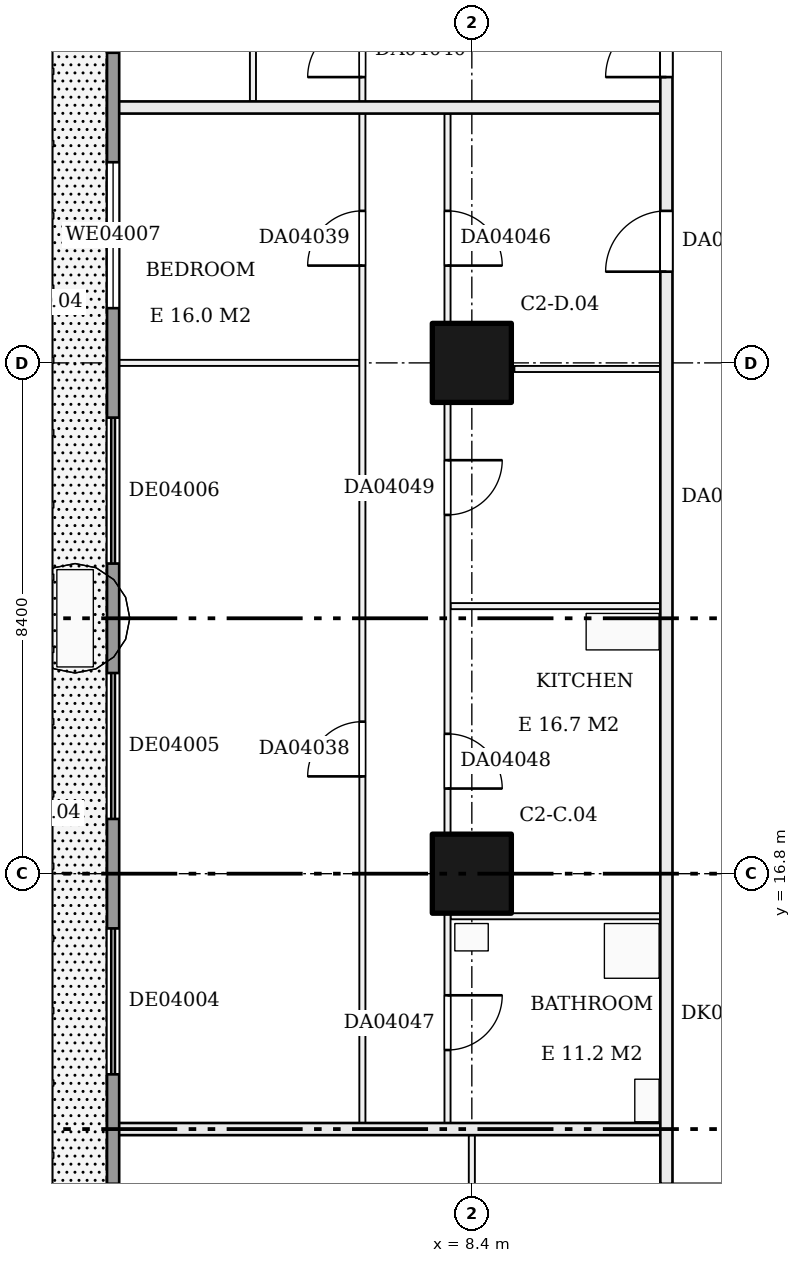
"""IFC4 building model, lengths in metres.
Left out: names, types, materials, properties, quantities, classifications, styles, units other than length and angle.
Written with IfcOpenShell. Run it as: python <this file> out.ifc"""

import sys

from ifc_helpers import new_model, si_unit, direction, frame, frame_2d, origin, origin_2d, place, context, subcontext, project, spatial, rectangle, extrude, element, fill, save


model = new_model("IFC4")
c1 = context("Model", 3, precision=1e-05, world=origin(), true_north=direction((0.0, 1.0)))
c2 = subcontext(c1, "Body", "Model", "MODEL_VIEW")
j1 = project(units=[si_unit("LENGTHUNIT", "METRE"), si_unit("PLANEANGLEUNIT", "RADIAN")], contexts=[c1])
p1 = place(None, origin())
s1 = spatial("IfcSite", under=j1, at=p1, CompositionType="ELEMENT")
p2 = place(p1, origin())
s2 = spatial("IfcBuilding", under=s1, at=p2, CompositionType="ELEMENT")
p3 = place(p2, frame((0.0, 0.0, 25.2)))
s3 = spatial("IfcBuildingStorey", under=s2, at=p3, CompositionType="ELEMENT", Elevation=25.2)
for number, where, z_axis, x_axis in (
    (1, (8.4, 16.8, 0.0), (0.0, 0.0, 1.0), (1.0, 0.0, 0.0)),
    (2, (8.4, 25.2, 0.0), (0.0, 0.0, 1.0), (1.0, 0.0, 0.0)),
):
    element("IfcColumn", number, at=place(p3, frame(where, z_axis=z_axis, x_axis=x_axis)), inside=s3, PredefinedType="COLUMN", context=c2, shape_type="SweptSolid", body=[
        extrude(rectangle(XDim=1.3, YDim=1.3, at=origin_2d()), origin(), (0.0, 0.0, 1.0), 3.22),
    ])
p4 = place(p3, frame((11.5, 11.6, 0.0), z_axis=(0.0, 0.0, 1.0), x_axis=(1.0, 0.0, 0.0)))
e3 = element("IfcWall", 3, at=p4, inside=s3, PredefinedType="PARTITIONING", context=c2, shape_type="SweptSolid", body=[
    extrude(rectangle(XDim=30.5, YDim=0.2, at=frame_2d((15.25, 0.0))), origin(), (0.0, 0.0, 1.0), 3.22),
])
p5 = place(p4, frame((8.04, 0.0, 0.0)))
e4 = element("IfcOpeningElement", 4, at=p5, cuts=e3, PredefinedType="OPENING", context=c2, shape_type="SweptSolid", body=[
    extrude(rectangle(XDim=1.0, YDim=2.1, at=frame_2d((0.5, 1.05))), frame((0.0, 0.11, 0.0), z_axis=(0.0, -1.0, 0.0), x_axis=(1.0, 0.0, 0.0)), (0.0, 0.0, 1.0), 0.22),
])
p6 = place(p4, frame((23.75, 0.0, 0.0)))
e5 = element("IfcOpeningElement", 5, at=p6, cuts=e3, PredefinedType="OPENING", context=c2, shape_type="SweptSolid", body=[
    extrude(rectangle(XDim=1.0, YDim=2.1, at=frame_2d((0.5, 1.05))), frame((0.0, 0.11, 0.0), z_axis=(0.0, -1.0, 0.0), x_axis=(1.0, 0.0, 0.0)), (0.0, 0.0, 1.0), 0.22),
])
p7 = place(p4, frame((26.8, 0.0, 0.0)))
e6 = element("IfcOpeningElement", 6, at=p7, cuts=e3, PredefinedType="OPENING", context=c2, shape_type="SweptSolid", body=[
    extrude(rectangle(XDim=1.0, YDim=2.1, at=frame_2d((0.5, 1.05))), frame((0.0, 0.11, 0.0), z_axis=(0.0, -1.0, 0.0), x_axis=(1.0, 0.0, 0.0)), (0.0, 0.0, 1.0), 0.22),
])
p8 = place(p3, frame((2.5, 12.6, 0.0), z_axis=(0.0, 0.0, 1.0), x_axis=(1.0, 0.0, 0.0)))
e7 = element("IfcWall", 7, at=p8, inside=s3, PredefinedType="PARTITIONING", context=c2, shape_type="SweptSolid", body=[
    extrude(rectangle(XDim=9.0, YDim=0.2, at=frame_2d((4.5, 0.0))), origin(), (0.0, 0.0, 1.0), 3.22),
])
for number, where, z_axis, x_axis in (
    (8, (8.05, 16.1, 0.0), (0.0, 0.0, 1.0), (1.0, 0.0, 0.0)),
    (9, (8.05, 21.2, 0.0), (0.0, 0.0, 1.0), (1.0, 0.0, 0.0)),
):
    element("IfcWall", number, at=place(p3, frame(where, z_axis=z_axis, x_axis=x_axis)), inside=s3, PredefinedType="PARTITIONING", context=c2, shape_type="SweptSolid", body=[
        extrude(rectangle(XDim=3.45, YDim=0.1, at=frame_2d((1.725, 0.0))), origin(), (0.0, 0.0, 1.0), 3.22),
    ])
p9 = place(p3, frame((9.1, 25.1, 0.0), z_axis=(0.0, 0.0, 1.0), x_axis=(1.0, 0.0, 0.0)))
e10 = element("IfcWall", 10, at=p9, inside=s3, PredefinedType="PARTITIONING", context=c2, shape_type="SweptSolid", body=[
    extrude(rectangle(XDim=2.4, YDim=0.1, at=frame_2d((1.2, 0.0))), origin(), (0.0, 0.0, 1.0), 3.22),
])
p10 = place(p3, frame((2.5, 25.2, 0.0), z_axis=(0.0, 0.0, 1.0), x_axis=(1.0, 0.0, 0.0)))
e11 = element("IfcWall", 11, at=p10, inside=s3, PredefinedType="PARTITIONING", context=c2, shape_type="SweptSolid", body=[
    extrude(rectangle(XDim=4.05, YDim=0.1, at=frame_2d((2.025, 0.0))), origin(), (0.0, 0.0, 1.0), 3.22),
])
p11 = place(p3, frame((2.5, 29.4, 0.0), z_axis=(0.0, 0.0, 1.0), x_axis=(1.0, 0.0, 0.0)))
e12 = element("IfcWall", 12, at=p11, inside=s3, PredefinedType="PARTITIONING", context=c2, shape_type="SweptSolid", body=[
    extrude(rectangle(XDim=9.0, YDim=0.2, at=frame_2d((4.5, 0.0))), origin(), (0.0, 0.0, 1.0), 3.22),
])
p12 = place(p3, frame((4.8, 29.5, 0.0), z_axis=(0.0, 0.0, 1.0), x_axis=(0.0, 1.0, 0.0)))
e13 = element("IfcWall", 13, at=p12, inside=s3, PredefinedType="PARTITIONING", context=c2, shape_type="SweptSolid", body=[
    extrude(rectangle(XDim=4.0, YDim=0.1, at=frame_2d((2.0, 0.0))), origin(), (0.0, 0.0, 1.0), 3.22),
])
p13 = place(p12, frame((1.5, 0.0, 0.0)))
e14 = element("IfcOpeningElement", 14, at=p13, cuts=e13, PredefinedType="OPENING", context=c2, shape_type="SweptSolid", body=[
    extrude(rectangle(XDim=0.9, YDim=2.1, at=frame_2d((0.45, 1.05))), frame((0.0, 0.06, 0.0), z_axis=(0.0, -1.0, 0.0), x_axis=(1.0, 0.0, 0.0)), (0.0, 0.0, 1.0), 0.12),
])
p14 = place(p3, frame((6.6, 12.7, 0.0), z_axis=(0.0, 0.0, 1.0), x_axis=(0.0, 1.0, 0.0)))
e15 = element("IfcWall", 15, at=p14, inside=s3, PredefinedType="PARTITIONING", context=c2, shape_type="SweptSolid", body=[
    extrude(rectangle(XDim=20.8, YDim=0.1, at=frame_2d((10.4, 0.0))), origin(), (0.0, 0.0, 1.0), 3.22),
])
p15 = place(p14, frame((5.7, 0.0, 0.0)))
e16 = element("IfcOpeningElement", 16, at=p15, cuts=e15, PredefinedType="OPENING", context=c2, shape_type="SweptSolid", body=[
    extrude(rectangle(XDim=0.9, YDim=2.1, at=frame_2d((0.45, 1.05))), frame((0.0, 0.06, 0.0), z_axis=(0.0, -1.0, 0.0), x_axis=(1.0, 0.0, 0.0)), (0.0, 0.0, 1.0), 0.12),
])
p16 = place(p14, frame((14.1, 0.0, 0.0)))
e17 = element("IfcOpeningElement", 17, at=p16, cuts=e15, PredefinedType="OPENING", context=c2, shape_type="SweptSolid", body=[
    extrude(rectangle(XDim=0.9, YDim=2.1, at=frame_2d((0.45, 1.05))), frame((0.0, 0.06, 0.0), z_axis=(0.0, -1.0, 0.0), x_axis=(1.0, 0.0, 0.0)), (0.0, 0.0, 1.0), 0.12),
])
p17 = place(p14, frame((17.2, 0.0, 0.0)))
e18 = element("IfcOpeningElement", 18, at=p17, cuts=e15, PredefinedType="OPENING", context=c2, shape_type="SweptSolid", body=[
    extrude(rectangle(XDim=0.9, YDim=2.1, at=frame_2d((0.45, 1.05))), frame((0.0, 0.06, 0.0), z_axis=(0.0, -1.0, 0.0), x_axis=(1.0, 0.0, 0.0)), (0.0, 0.0, 1.0), 0.12),
])
p18 = place(p14, frame((19.36, 0.0, 0.0)))
e19 = element("IfcOpeningElement", 19, at=p18, cuts=e15, PredefinedType="OPENING", context=c2, shape_type="SweptSolid", body=[
    extrude(rectangle(XDim=0.9, YDim=2.1, at=frame_2d((0.45, 1.05))), frame((0.0, 0.06, 0.0), z_axis=(0.0, -1.0, 0.0), x_axis=(1.0, 0.0, 0.0)), (0.0, 0.0, 1.0), 0.12),
])
p19 = place(p3, frame((8.0, 12.7, 0.0), z_axis=(0.0, 0.0, 1.0), x_axis=(0.0, 1.0, 0.0)))
e20 = element("IfcWall", 20, at=p19, inside=s3, PredefinedType="PARTITIONING", context=c2, shape_type="SweptSolid", body=[
    extrude(rectangle(XDim=16.6, YDim=0.1, at=frame_2d((8.3, 0.0))), origin(), (0.0, 0.0, 1.0), 3.22),
])
p20 = place(p19, frame((14.1, 0.0, 0.0)))
e21 = element("IfcOpeningElement", 21, at=p20, cuts=e20, PredefinedType="OPENING", context=c2, shape_type="SweptSolid", body=[
    extrude(rectangle(XDim=0.9, YDim=2.1, at=frame_2d((0.45, 1.05))), frame((0.0, 0.06, 0.0), z_axis=(0.0, -1.0, 0.0), x_axis=(1.0, 0.0, 0.0)), (0.0, 0.0, 1.0), 0.12),
])
p21 = place(p19, frame((1.2, 0.0, 0.0)))
e22 = element("IfcOpeningElement", 22, at=p21, cuts=e20, PredefinedType="OPENING", context=c2, shape_type="SweptSolid", body=[
    extrude(rectangle(XDim=0.9, YDim=2.1, at=frame_2d((0.45, 1.05))), frame((0.0, 0.06, 0.0), z_axis=(0.0, -1.0, 0.0), x_axis=(1.0, 0.0, 0.0)), (0.0, 0.0, 1.0), 0.12),
])
p22 = place(p19, frame((5.5, 0.0, 0.0)))
e23 = element("IfcOpeningElement", 23, at=p22, cuts=e20, PredefinedType="OPENING", context=c2, shape_type="SweptSolid", body=[
    extrude(rectangle(XDim=0.9, YDim=2.1, at=frame_2d((0.45, 1.05))), frame((0.0, 0.06, 0.0), z_axis=(0.0, -1.0, 0.0), x_axis=(1.0, 0.0, 0.0)), (0.0, 0.0, 1.0), 0.12),
])
p23 = place(p19, frame((10.0, 0.0, 0.0)))
e24 = element("IfcOpeningElement", 24, at=p23, cuts=e20, PredefinedType="OPENING", context=c2, shape_type="SweptSolid", body=[
    extrude(rectangle(XDim=0.9, YDim=2.1, at=frame_2d((0.45, 1.05))), frame((0.0, 0.06, 0.0), z_axis=(0.0, -1.0, 0.0), x_axis=(1.0, 0.0, 0.0)), (0.0, 0.0, 1.0), 0.12),
])
p24 = place(p3, frame((8.4, 9.1, 0.0), z_axis=(0.0, 0.0, 1.0), x_axis=(0.0, 1.0, 0.0)))
e25 = element("IfcWall", 25, at=p24, inside=s3, PredefinedType="PARTITIONING", context=c2, shape_type="SweptSolid", body=[
    extrude(rectangle(XDim=3.4, YDim=0.1, at=frame_2d((1.7, 0.0))), origin(), (0.0, 0.0, 1.0), 3.22),
])
p25 = place(p3, frame((11.6, 11.7, 0.0), z_axis=(0.0, 0.0, 1.0), x_axis=(0.0, 1.0, 0.0)))
e26 = element("IfcWall", 26, at=p25, inside=s3, PredefinedType="PARTITIONING", context=c2, shape_type="SweptSolid", body=[
    extrude(rectangle(XDim=30.3, YDim=0.2, at=frame_2d((15.15, 0.0))), origin(), (0.0, 0.0, 1.0), 3.22),
])
p26 = place(p25, frame((15.0, 0.0, 0.0)))
e27 = element("IfcOpeningElement", 27, at=p26, cuts=e26, PredefinedType="OPENING", context=c2, shape_type="SweptSolid", body=[
    extrude(rectangle(XDim=1.0, YDim=2.1, at=frame_2d((0.5, 1.05))), frame((0.0, 0.11, 0.0), z_axis=(0.0, -1.0, 0.0), x_axis=(1.0, 0.0, 0.0)), (0.0, 0.0, 1.0), 0.22),
])
p27 = place(p25, frame((18.2, 0.0, 0.0)))
e28 = element("IfcOpeningElement", 28, at=p27, cuts=e26, PredefinedType="OPENING", context=c2, shape_type="SweptSolid", body=[
    extrude(rectangle(XDim=1.0, YDim=2.1, at=frame_2d((0.5, 1.05))), frame((0.0, 0.11, 0.0), z_axis=(0.0, -1.0, 0.0), x_axis=(1.0, 0.0, 0.0)), (0.0, 0.0, 1.0), 0.22),
])
p28 = place(p25, frame((22.4, 0.0, 0.0)))
e29 = element("IfcOpeningElement", 29, at=p28, cuts=e26, PredefinedType="OPENING", context=c2, shape_type="SweptSolid", body=[
    extrude(rectangle(XDim=1.0, YDim=2.1, at=frame_2d((0.5, 1.05))), frame((0.0, 0.11, 0.0), z_axis=(0.0, -1.0, 0.0), x_axis=(1.0, 0.0, 0.0)), (0.0, 0.0, 1.0), 0.22),
])
p29 = place(p25, frame((28.84, 0.0, 0.0)))
e30 = element("IfcOpeningElement", 30, at=p29, cuts=e26, PredefinedType="OPENING", context=c2, shape_type="SweptSolid", body=[
    extrude(rectangle(XDim=1.0, YDim=2.1, at=frame_2d((0.5, 1.05))), frame((0.0, 0.11, 0.0), z_axis=(0.0, -1.0, 0.0), x_axis=(1.0, 0.0, 0.0)), (0.0, 0.0, 1.0), 0.22),
])
p30 = place(p3, frame((2.5, 53.8, 0.0), z_axis=(0.0, 0.0, 1.0), x_axis=(0.0, -1.0, 0.0)))
e31 = element("IfcWall", 31, at=p30, inside=s3, PredefinedType="SOLIDWALL", context=c2, shape_type="SweptSolid", body=[
    extrude(rectangle(XDim=48.8, YDim=0.2, at=frame_2d((24.4, 0.0))), origin(), (0.0, 0.0, 1.0), 3.22),
])
p31 = place(p30, frame((46.1, 0.0, 0.0)))
e32 = element("IfcOpeningElement", 32, at=p31, cuts=e31, PredefinedType="OPENING", context=c2, shape_type="SweptSolid", body=[
    extrude(rectangle(XDim=2.4, YDim=2.2, at=frame_2d((1.2, 1.1))), frame((0.0, 0.11, 0.0), z_axis=(0.0, -1.0, 0.0), x_axis=(1.0, 0.0, 0.0)), (0.0, 0.0, 1.0), 0.22),
])
p32 = place(p30, frame((42.1, 0.0, 0.0)))
e33 = element("IfcOpeningElement", 33, at=p32, cuts=e31, PredefinedType="OPENING", context=c2, shape_type="SweptSolid", body=[
    extrude(rectangle(XDim=2.4, YDim=2.2, at=frame_2d((1.2, 1.1))), frame((0.0, 0.11, 0.0), z_axis=(0.0, -1.0, 0.0), x_axis=(1.0, 0.0, 0.0)), (0.0, 0.0, 1.0), 0.22),
])
p33 = place(p30, frame((37.9, 0.0, 0.0)))
e34 = element("IfcOpeningElement", 34, at=p33, cuts=e31, PredefinedType="OPENING", context=c2, shape_type="SweptSolid", body=[
    extrude(rectangle(XDim=2.4, YDim=2.2, at=frame_2d((1.2, 1.1))), frame((0.0, 0.11, 0.0), z_axis=(0.0, -1.0, 0.0), x_axis=(1.0, 0.0, 0.0)), (0.0, 0.0, 1.0), 0.22),
])
p34 = place(p30, frame((33.7, 0.0, 0.0)))
e35 = element("IfcOpeningElement", 35, at=p34, cuts=e31, PredefinedType="OPENING", context=c2, shape_type="SweptSolid", body=[
    extrude(rectangle(XDim=2.4, YDim=2.2, at=frame_2d((1.2, 1.1))), frame((0.0, 0.11, 0.0), z_axis=(0.0, -1.0, 0.0), x_axis=(1.0, 0.0, 0.0)), (0.0, 0.0, 1.0), 0.22),
])
p35 = place(p30, frame((29.5, 0.0, 0.0)))
e36 = element("IfcOpeningElement", 36, at=p35, cuts=e31, PredefinedType="OPENING", context=c2, shape_type="SweptSolid", body=[
    extrude(rectangle(XDim=2.4, YDim=2.2, at=frame_2d((1.2, 1.1))), frame((0.0, 0.11, 0.0), z_axis=(0.0, -1.0, 0.0), x_axis=(1.0, 0.0, 0.0)), (0.0, 0.0, 1.0), 0.22),
])
p36 = place(p30, frame((25.3, 0.0, 0.9)))
e37 = element("IfcOpeningElement", 37, at=p36, cuts=e31, PredefinedType="OPENING", context=c2, shape_type="SweptSolid", body=[
    extrude(rectangle(XDim=2.4, YDim=1.5, at=frame_2d((1.2, 0.75))), frame((0.0, 0.11, 0.0), z_axis=(0.0, -1.0, 0.0), x_axis=(1.0, 0.0, 0.0)), (0.0, 0.0, 1.0), 0.22),
])
p37 = place(p30, frame((21.1, 0.0, 0.0)))
e38 = element("IfcOpeningElement", 38, at=p37, cuts=e31, PredefinedType="OPENING", context=c2, shape_type="SweptSolid", body=[
    extrude(rectangle(XDim=2.4, YDim=2.2, at=frame_2d((1.2, 1.1))), frame((0.0, 0.11, 0.0), z_axis=(0.0, -1.0, 0.0), x_axis=(1.0, 0.0, 0.0)), (0.0, 0.0, 1.0), 0.22),
])
p38 = place(p30, frame((16.9, 0.0, 0.0)))
e39 = element("IfcOpeningElement", 39, at=p38, cuts=e31, PredefinedType="OPENING", context=c2, shape_type="SweptSolid", body=[
    extrude(rectangle(XDim=2.4, YDim=2.2, at=frame_2d((1.2, 1.1))), frame((0.0, 0.11, 0.0), z_axis=(0.0, -1.0, 0.0), x_axis=(1.0, 0.0, 0.0)), (0.0, 0.0, 1.0), 0.22),
])
p39 = place(p30, frame((12.7, 0.0, 0.0)))
e40 = element("IfcOpeningElement", 40, at=p39, cuts=e31, PredefinedType="OPENING", context=c2, shape_type="SweptSolid", body=[
    extrude(rectangle(XDim=2.4, YDim=2.2, at=frame_2d((1.2, 1.1))), frame((0.0, 0.11, 0.0), z_axis=(0.0, -1.0, 0.0), x_axis=(1.0, 0.0, 0.0)), (0.0, 0.0, 1.0), 0.22),
])
p40 = place(p30, frame((8.5, 0.0, 0.9)))
e41 = element("IfcOpeningElement", 41, at=p40, cuts=e31, PredefinedType="OPENING", context=c2, shape_type="SweptSolid", body=[
    extrude(rectangle(XDim=2.4, YDim=1.5, at=frame_2d((1.2, 0.75))), frame((0.0, 0.11, 0.0), z_axis=(0.0, -1.0, 0.0), x_axis=(1.0, 0.0, 0.0)), (0.0, 0.0, 1.0), 0.22),
])
p41 = place(p30, frame((4.3, 0.0, 0.9)))
e42 = element("IfcOpeningElement", 42, at=p41, cuts=e31, PredefinedType="OPENING", context=c2, shape_type="SweptSolid", body=[
    extrude(rectangle(XDim=2.4, YDim=1.5, at=frame_2d((1.2, 0.75))), frame((0.0, 0.11, 0.0), z_axis=(0.0, -1.0, 0.0), x_axis=(1.0, 0.0, 0.0)), (0.0, 0.0, 1.0), 0.22),
])
p42 = place(p30, frame((0.3, 0.0, 0.9)))
e43 = element("IfcOpeningElement", 43, at=p42, cuts=e31, PredefinedType="OPENING", context=c2, shape_type="SweptSolid", body=[
    extrude(rectangle(XDim=2.4, YDim=1.5, at=frame_2d((1.2, 0.75))), frame((0.0, 0.11, 0.0), z_axis=(0.0, -1.0, 0.0), x_axis=(1.0, 0.0, 0.0)), (0.0, 0.0, 1.0), 0.22),
])
p43 = place(p15, origin())
e44 = element("IfcDoor", 44, at=p43, inside=s3, OperationType="SINGLE_SWING_LEFT", PredefinedType="DOOR", context=c2, shape_type="SweptSolid", body=[
    extrude(rectangle(XDim=0.9, YDim=2.1, at=frame_2d((0.45, 1.05))), frame((0.0, 0.025, 0.0), z_axis=(0.0, -1.0, 0.0), x_axis=(1.0, 0.0, 0.0)), (0.0, 0.0, 1.0), 0.05),
])
fill(e16, e44)
p44 = place(p16, origin())
e45 = element("IfcDoor", 45, at=p44, inside=s3, OperationType="SINGLE_SWING_LEFT", PredefinedType="DOOR", context=c2, shape_type="SweptSolid", body=[
    extrude(rectangle(XDim=0.9, YDim=2.1, at=frame_2d((0.45, 1.05))), frame((0.0, 0.025, 0.0), z_axis=(0.0, -1.0, 0.0), x_axis=(1.0, 0.0, 0.0)), (0.0, 0.0, 1.0), 0.05),
])
fill(e17, e45)
p45 = place(p17, origin())
e46 = element("IfcDoor", 46, at=p45, inside=s3, OperationType="SINGLE_SWING_LEFT", PredefinedType="DOOR", context=c2, shape_type="SweptSolid", body=[
    extrude(rectangle(XDim=0.9, YDim=2.1, at=frame_2d((0.45, 1.05))), frame((0.0, 0.025, 0.0), z_axis=(0.0, -1.0, 0.0), x_axis=(1.0, 0.0, 0.0)), (0.0, 0.0, 1.0), 0.05),
])
fill(e18, e46)
p46 = place(p20, frame((0.9, 0.0, 0.0), z_axis=(0.0, 0.0, 1.0), x_axis=(-1.0, 0.0, 0.0)))
e47 = element("IfcDoor", 47, at=p46, inside=s3, OperationType="SINGLE_SWING_RIGHT", PredefinedType="DOOR", context=c2, shape_type="SweptSolid", body=[
    extrude(rectangle(XDim=0.9, YDim=2.1, at=frame_2d((0.45, 1.05))), frame((0.0, 0.025, 0.0), z_axis=(0.0, -1.0, 0.0), x_axis=(1.0, 0.0, 0.0)), (0.0, 0.0, 1.0), 0.05),
])
fill(e21, e47)
p47 = place(p21, frame((0.9, 0.0, 0.0), z_axis=(0.0, 0.0, 1.0), x_axis=(-1.0, 0.0, 0.0)))
e48 = element("IfcDoor", 48, at=p47, inside=s3, OperationType="SINGLE_SWING_LEFT", PredefinedType="DOOR", context=c2, shape_type="SweptSolid", body=[
    extrude(rectangle(XDim=0.9, YDim=2.1, at=frame_2d((0.45, 1.05))), frame((0.0, 0.025, 0.0), z_axis=(0.0, -1.0, 0.0), x_axis=(1.0, 0.0, 0.0)), (0.0, 0.0, 1.0), 0.05),
])
fill(e22, e48)
p48 = place(p22, frame((0.9, 0.0, 0.0), z_axis=(0.0, 0.0, 1.0), x_axis=(-1.0, 0.0, 0.0)))
e49 = element("IfcDoor", 49, at=p48, inside=s3, OperationType="SINGLE_SWING_RIGHT", PredefinedType="DOOR", context=c2, shape_type="SweptSolid", body=[
    extrude(rectangle(XDim=0.9, YDim=2.1, at=frame_2d((0.45, 1.05))), frame((0.0, 0.025, 0.0), z_axis=(0.0, -1.0, 0.0), x_axis=(1.0, 0.0, 0.0)), (0.0, 0.0, 1.0), 0.05),
])
fill(e23, e49)
p49 = place(p23, frame((0.9, 0.0, 0.0), z_axis=(0.0, 0.0, 1.0), x_axis=(-1.0, 0.0, 0.0)))
e50 = element("IfcDoor", 50, at=p49, inside=s3, OperationType="SINGLE_SWING_LEFT", PredefinedType="DOOR", context=c2, shape_type="SweptSolid", body=[
    extrude(rectangle(XDim=0.9, YDim=2.1, at=frame_2d((0.45, 1.05))), frame((0.0, 0.025, 0.0), z_axis=(0.0, -1.0, 0.0), x_axis=(1.0, 0.0, 0.0)), (0.0, 0.0, 1.0), 0.05),
])
fill(e24, e50)
p50 = place(p26, origin())
e51 = element("IfcDoor", 51, at=p50, inside=s3, OperationType="SINGLE_SWING_LEFT", PredefinedType="DOOR", context=c2, shape_type="SweptSolid", body=[
    extrude(rectangle(XDim=1.0, YDim=2.1, at=frame_2d((0.5, 1.05))), frame((0.0, 0.025, 0.0), z_axis=(0.0, -1.0, 0.0), x_axis=(1.0, 0.0, 0.0)), (0.0, 0.0, 1.0), 0.05),
])
fill(e27, e51)
p51 = place(p27, origin())
e52 = element("IfcDoor", 52, at=p51, inside=s3, OperationType="SINGLE_SWING_LEFT", PredefinedType="DOOR", context=c2, shape_type="SweptSolid", body=[
    extrude(rectangle(XDim=1.0, YDim=2.1, at=frame_2d((0.5, 1.05))), frame((0.0, 0.025, 0.0), z_axis=(0.0, -1.0, 0.0), x_axis=(1.0, 0.0, 0.0)), (0.0, 0.0, 1.0), 0.05),
])
fill(e28, e52)
p52 = place(p33, origin())
e53 = element("IfcDoor", 53, at=p52, inside=s3, OperationType="DOUBLE_DOOR_SLIDING", PredefinedType="DOOR", context=c2, shape_type="SweptSolid", body=[
    extrude(rectangle(XDim=2.4, YDim=2.2, at=frame_2d((1.2, 1.1))), frame((0.0, 0.025, 0.0), z_axis=(0.0, -1.0, 0.0), x_axis=(1.0, 0.0, 0.0)), (0.0, 0.0, 1.0), 0.05),
])
fill(e34, e53)
p53 = place(p34, origin())
e54 = element("IfcDoor", 54, at=p53, inside=s3, OperationType="DOUBLE_DOOR_SLIDING", PredefinedType="DOOR", context=c2, shape_type="SweptSolid", body=[
    extrude(rectangle(XDim=2.4, YDim=2.2, at=frame_2d((1.2, 1.1))), frame((0.0, 0.025, 0.0), z_axis=(0.0, -1.0, 0.0), x_axis=(1.0, 0.0, 0.0)), (0.0, 0.0, 1.0), 0.05),
])
fill(e35, e54)
p54 = place(p35, origin())
e55 = element("IfcDoor", 55, at=p54, inside=s3, OperationType="DOUBLE_DOOR_SLIDING", PredefinedType="DOOR", context=c2, shape_type="SweptSolid", body=[
    extrude(rectangle(XDim=2.4, YDim=2.2, at=frame_2d((1.2, 1.1))), frame((0.0, 0.025, 0.0), z_axis=(0.0, -1.0, 0.0), x_axis=(1.0, 0.0, 0.0)), (0.0, 0.0, 1.0), 0.05),
])
fill(e36, e55)
p55 = place(p36, origin())
e56 = element("IfcWindow", 56, at=p55, inside=s3, PartitioningType="SINGLE_PANEL", PredefinedType="WINDOW", context=c2, shape_type="SweptSolid", body=[
    extrude(rectangle(XDim=2.4, YDim=1.5, at=frame_2d((1.2, 0.75))), frame((0.0, 0.03, 0.0), z_axis=(0.0, -1.0, 0.0), x_axis=(1.0, 0.0, 0.0)), (0.0, 0.0, 1.0), 0.06),
])
fill(e37, e56)
save(model, sys.argv[1])
